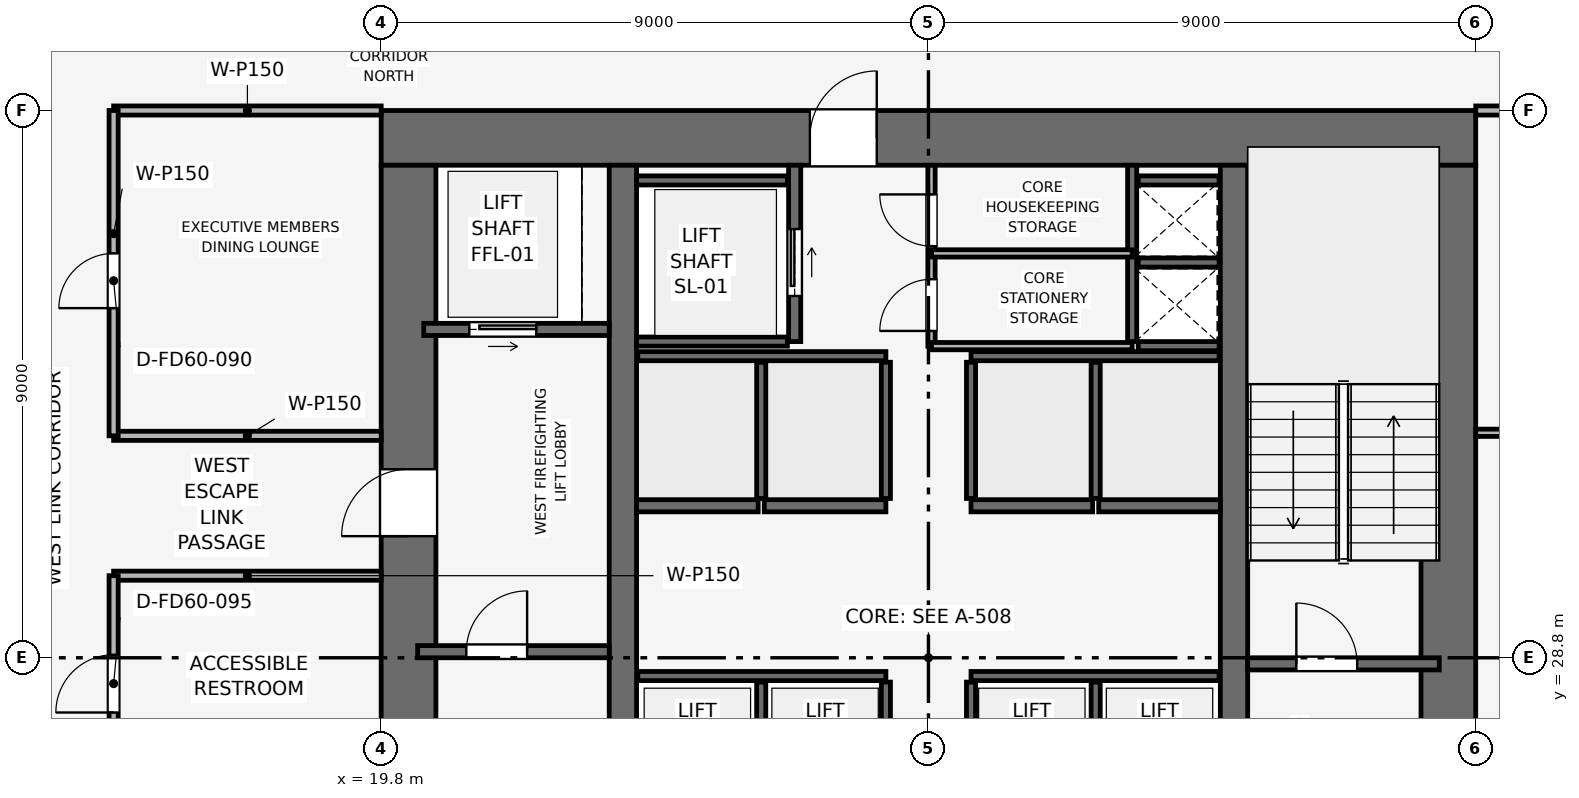
"""IFC4 building model, lengths in metres.
Left out: names, types, materials, properties, quantities, classifications, styles, units other than length and angle.
Written with IfcOpenShell. Run it as: python <this file> out.ifc"""

import sys

from ifc_helpers import new_model, si_unit, direction, frame, frame_2d, origin, place, context, subcontext, project, spatial, rectangle, extrude, element, fill, save


model = new_model("IFC4")
c1 = context("Model", 3, precision=1e-05, world=origin(), true_north=direction((0.0, 1.0)))
c2 = subcontext(c1, "Body", "Model", "MODEL_VIEW")
j1 = project(units=[si_unit("LENGTHUNIT", "METRE"), si_unit("PLANEANGLEUNIT", "RADIAN")], contexts=[c1])
p1 = place(None, origin())
s1 = spatial("IfcSite", under=j1, at=p1, CompositionType="ELEMENT")
p2 = place(p1, origin())
s2 = spatial("IfcBuilding", under=s1, at=p2, CompositionType="ELEMENT")
p3 = place(p2, frame((0.0, 0.0, 187.05)))
s3 = spatial("IfcBuildingStorey", under=s2, at=p3, CompositionType="ELEMENT", Elevation=187.05)
p4 = place(p3, frame((19.8, 37.35, 0.0), z_axis=(0.0, 0.0, 1.0), x_axis=(1.0, 0.0, 0.0)))
e1 = element("IfcWall", 1, at=p4, inside=s3, PredefinedType="SHEAR", context=c2, shape_type="SweptSolid", body=[
    extrude(rectangle(XDim=18.0, YDim=0.9, at=frame_2d((9.0, 0.0))), origin(), (0.0, 0.0, 1.0), 3.75),
])
p5 = place(p4, frame((7.05, 0.0, 0.0)))
e2 = element("IfcOpeningElement", 2, at=p5, cuts=e1, PredefinedType="OPENING", context=c2, shape_type="SweptSolid", body=[
    extrude(rectangle(XDim=1.1, YDim=2.15, at=frame_2d((0.55, 1.075))), frame((0.0, 0.46, 0.0), z_axis=(0.0, -1.0, 0.0), x_axis=(1.0, 0.0, 0.0)), (0.0, 0.0, 1.0), 0.92),
])
p6 = place(p3, frame((20.25, 20.7, 0.0), z_axis=(0.0, 0.0, 1.0), x_axis=(0.0, 1.0, 0.0)))
e3 = element("IfcWall", 3, at=p6, inside=s3, PredefinedType="SHEAR", context=c2, shape_type="SweptSolid", body=[
    extrude(rectangle(XDim=16.2, YDim=0.9, at=frame_2d((8.1, 0.0))), origin(), (0.0, 0.0, 1.0), 3.75),
])
p7 = place(p6, frame((10.1, 0.0, 0.0)))
e4 = element("IfcOpeningElement", 4, at=p7, cuts=e3, PredefinedType="OPENING", context=c2, shape_type="SweptSolid", body=[
    extrude(rectangle(XDim=1.1, YDim=2.15, at=frame_2d((0.55, 1.075))), frame((0.0, 0.46, 0.0), z_axis=(0.0, -1.0, 0.0), x_axis=(1.0, 0.0, 0.0)), (0.0, 0.0, 1.0), 0.92),
])
p8 = place(p3, frame((37.35, 20.7, 0.0), z_axis=(0.0, 0.0, 1.0), x_axis=(0.0, 1.0, 0.0)))
e5 = element("IfcWall", 5, at=p8, inside=s3, PredefinedType="SHEAR", context=c2, shape_type="SweptSolid", body=[
    extrude(rectangle(XDim=16.2, YDim=0.9, at=frame_2d((8.1, 0.0))), origin(), (0.0, 0.0, 1.0), 3.75),
])
p9 = place(p8, frame((4.6, 0.0, 0.0)))
e6 = element("IfcOpeningElement", 6, at=p9, cuts=e5, PredefinedType="OPENING", context=c2, shape_type="SweptSolid", body=[
    extrude(rectangle(XDim=1.1, YDim=2.15, at=frame_2d((0.55, 1.075))), frame((0.0, 0.46, 0.0), z_axis=(0.0, -1.0, 0.0), x_axis=(1.0, 0.0, 0.0)), (0.0, 0.0, 1.0), 0.92),
])
for number, where, z_axis, x_axis in (
    (7, (23.775, 20.7, 0.0), (0.0, 0.0, 1.0), (0.0, 1.0, 0.0)),
    (8, (33.825, 20.7, 0.0), (0.0, 0.0, 1.0), (0.0, 1.0, 0.0)),
):
    element("IfcWall", number, at=place(p3, frame(where, z_axis=z_axis, x_axis=x_axis)), inside=s3, PredefinedType="SHEAR", context=c2, shape_type="SweptSolid", body=[
        extrude(rectangle(XDim=16.2, YDim=0.45, at=frame_2d((8.1, 0.0))), origin(), (0.0, 0.0, 1.0), 3.75),
    ])
p10 = place(p3, frame((20.4, 28.9, 0.0), z_axis=(0.0, 0.0, 1.0), x_axis=(1.0, 0.0, 0.0)))
e9 = element("IfcWall", 9, at=p10, inside=s3, PredefinedType="SHEAR", context=c2, shape_type="SweptSolid", body=[
    extrude(rectangle(XDim=3.15, YDim=0.2, at=frame_2d((1.575, 0.0))), origin(), (0.0, 0.0, 1.0), 3.495),
])
p11 = place(p10, frame((0.8, 0.0, 0.0)))
e10 = element("IfcOpeningElement", 10, at=p11, cuts=e9, PredefinedType="OPENING", context=c2, shape_type="SweptSolid", body=[
    extrude(rectangle(XDim=1.0, YDim=2.1, at=frame_2d((0.5, 1.05))), frame((0.0, 0.11, 0.0), z_axis=(0.0, -1.0, 0.0), x_axis=(1.0, 0.0, 0.0)), (0.0, 0.0, 1.0), 0.22),
])
p12 = place(p3, frame((34.05, 28.7, 0.0), z_axis=(0.0, 0.0, 1.0), x_axis=(1.0, 0.0, 0.0)))
e11 = element("IfcWall", 11, at=p12, inside=s3, PredefinedType="SHEAR", context=c2, shape_type="SweptSolid", body=[
    extrude(rectangle(XDim=3.15, YDim=0.2, at=frame_2d((1.575, 0.0))), origin(), (0.0, 0.0, 1.0), 3.495),
])
p13 = place(p12, frame((0.8, 0.0, 0.0)))
e12 = element("IfcOpeningElement", 12, at=p13, cuts=e11, PredefinedType="OPENING", context=c2, shape_type="SweptSolid", body=[
    extrude(rectangle(XDim=1.0, YDim=2.1, at=frame_2d((0.5, 1.05))), frame((0.0, 0.11, 0.0), z_axis=(0.0, -1.0, 0.0), x_axis=(1.0, 0.0, 0.0)), (0.0, 0.0, 1.0), 0.22),
])
p14 = place(p3, frame((32.15, 34.0, 0.0), z_axis=(0.0, 0.0, 1.0), x_axis=(0.0, 1.0, 0.0)))
e13 = element("IfcWall", 13, at=p14, inside=s3, PredefinedType="SHEAR", context=c2, shape_type="SweptSolid", body=[
    extrude(rectangle(XDim=2.9, YDim=0.15, at=frame_2d((1.45, 0.0))), origin(), (0.0, 0.0, 1.0), 3.495),
])
for number, where, z_axis, x_axis in (
    (14, (32.25, 33.925, 0.0), (0.0, 0.0, 1.0), (1.0, 0.0, 0.0)),
    (15, (32.25, 35.3, 0.0), (0.0, 0.0, 1.0), (1.0, 0.0, 0.0)),
):
    element("IfcWall", number, at=place(p3, frame(where, z_axis=z_axis, x_axis=x_axis)), inside=s3, PredefinedType="SHEAR", context=c2, shape_type="SweptSolid", body=[
        extrude(rectangle(XDim=1.33, YDim=0.15, at=frame_2d((0.665, 0.0))), origin(), (0.0, 0.0, 1.0), 3.495),
    ])
p15 = place(p3, frame((20.5, 34.2, 0.0), z_axis=(0.0, 0.0, 1.0), x_axis=(1.0, 0.0, 0.0)))
e16 = element("IfcWall", 16, at=p15, inside=s3, PredefinedType="SHEAR", context=c2, shape_type="SweptSolid", body=[
    extrude(rectangle(XDim=3.05, YDim=0.2, at=frame_2d((1.525, 0.0))), origin(), (0.0, 0.0, 1.0), 3.495),
])
p16 = place(p15, frame((0.75, 0.0, 0.0)))
e17 = element("IfcOpeningElement", 17, at=p16, cuts=e16, PredefinedType="OPENING", context=c2, shape_type="SweptSolid", body=[
    extrude(rectangle(XDim=1.1, YDim=2.15, at=frame_2d((0.55, 1.075))), frame((0.0, 0.11, 0.0), z_axis=(0.0, -1.0, 0.0), x_axis=(1.0, 0.0, 0.0)), (0.0, 0.0, 1.0), 0.22),
])
p17 = place(p3, frame((26.6, 34.0, 0.0), z_axis=(0.0, 0.0, 1.0), x_axis=(0.0, 1.0, 0.0)))
e18 = element("IfcWall", 18, at=p17, inside=s3, PredefinedType="SHEAR", context=c2, shape_type="SweptSolid", body=[
    extrude(rectangle(XDim=2.9, YDim=0.2, at=frame_2d((1.45, 0.0))), origin(), (0.0, 0.0, 1.0), 3.495),
])
p18 = place(p17, frame((0.75, 0.0, 0.0)))
e19 = element("IfcOpeningElement", 19, at=p18, cuts=e18, PredefinedType="OPENING", context=c2, shape_type="SweptSolid", body=[
    extrude(rectangle(XDim=1.1, YDim=2.15, at=frame_2d((0.55, 1.075))), frame((0.0, 0.11, 0.0), z_axis=(0.0, -1.0, 0.0), x_axis=(1.0, 0.0, 0.0)), (0.0, 0.0, 1.0), 0.22),
])
for number, where, z_axis, x_axis in (
    (20, (24.0, 34.0, 0.0), (0.0, 0.0, 1.0), (1.0, 0.0, 0.0)),
    (21, (24.0, 36.65, 0.0), (0.0, 0.0, 1.0), (1.0, 0.0, 0.0)),
):
    element("IfcWall", number, at=place(p3, frame(where, z_axis=z_axis, x_axis=x_axis)), inside=s3, PredefinedType="SHEAR", context=c2, shape_type="SweptSolid", body=[
        extrude(rectangle(XDim=2.48, YDim=0.15, at=frame_2d((1.24, 0.0))), origin(), (0.0, 0.0, 1.0), 3.495),
    ])
for number, where, z_axis, x_axis in (
    (22, (24.0, 31.3, 0.0), (0.0, 0.0, 1.0), (1.0, 0.0, 0.0)),
    (23, (26.1, 31.3, 0.0), (0.0, 0.0, 1.0), (1.0, 0.0, 0.0)),
    (24, (29.5, 31.3, 0.0), (0.0, 0.0, 1.0), (1.0, 0.0, 0.0)),
    (25, (31.6, 31.3, 0.0), (0.0, 0.0, 1.0), (1.0, 0.0, 0.0)),
):
    element("IfcWall", number, at=place(p3, frame(where, z_axis=z_axis, x_axis=x_axis)), inside=s3, PredefinedType="SHEAR", context=c2, shape_type="SweptSolid", body=[
        extrude(rectangle(XDim=2.0, YDim=0.2, at=frame_2d((1.0, 0.0))), origin(), (0.0, 0.0, 1.0), 3.495),
    ])
p19 = place(p3, frame((32.25, 36.65, 0.0), z_axis=(0.0, 0.0, 1.0), x_axis=(1.0, 0.0, 0.0)))
e26 = element("IfcWall", 26, at=p19, inside=s3, PredefinedType="SHEAR", context=c2, shape_type="SweptSolid", body=[
    extrude(rectangle(XDim=1.33, YDim=0.15, at=frame_2d((0.665, 0.0))), origin(), (0.0, 0.0, 1.0), 3.495),
])
for number, where, z_axis, x_axis in (
    (27, (24.02, 28.5, 0.0), (0.0, 0.0, 1.0), (1.0, 0.0, 0.0)),
    (28, (29.5, 28.5, 0.0), (0.0, 0.0, 1.0), (1.0, 0.0, 0.0)),
):
    element("IfcWall", number, at=place(p3, frame(where, z_axis=z_axis, x_axis=x_axis)), inside=s3, PredefinedType="SHEAR", context=c2, shape_type="SweptSolid", body=[
        extrude(rectangle(XDim=4.08, YDim=0.15, at=frame_2d((2.04, 0.0))), origin(), (0.0, 0.0, 1.0), 3.495),
    ])
for number, where, z_axis, x_axis in (
    (29, (26.05, 26.12, 0.0), (0.0, 0.0, 1.0), (0.0, 1.0, 0.0)),
    (30, (28.1, 26.12, 0.0), (0.0, 0.0, 1.0), (0.0, 1.0, 0.0)),
    (31, (29.5, 26.12, 0.0), (0.0, 0.0, 1.0), (0.0, 1.0, 0.0)),
    (32, (31.55, 26.12, 0.0), (0.0, 0.0, 1.0), (0.0, 1.0, 0.0)),
):
    element("IfcWall", number, at=place(p3, frame(where, z_axis=z_axis, x_axis=x_axis)), inside=s3, PredefinedType="SHEAR", context=c2, shape_type="SweptSolid", body=[
        extrude(rectangle(XDim=2.28, YDim=0.15, at=frame_2d((1.14, 0.0))), origin(), (0.0, 0.0, 1.0), 3.495),
    ])
for number, where, z_axis, x_axis in (
    (33, (24.02, 33.76, 0.0), (0.0, 0.0, 1.0), (1.0, 0.0, 0.0)),
    (34, (29.5, 33.76, 0.0), (0.0, 0.0, 1.0), (1.0, 0.0, 0.0)),
):
    element("IfcWall", number, at=place(p3, frame(where, z_axis=z_axis, x_axis=x_axis)), inside=s3, PredefinedType="SHEAR", context=c2, shape_type="SweptSolid", body=[
        extrude(rectangle(XDim=4.08, YDim=0.15, at=frame_2d((2.04, 0.0))), origin(), (0.0, 0.0, 1.0), 3.495),
    ])
for number, where, z_axis, x_axis in (
    (35, (26.05, 31.42, 0.0), (0.0, 0.0, 1.0), (0.0, 1.0, 0.0)),
    (36, (28.1, 31.42, 0.0), (0.0, 0.0, 1.0), (0.0, 1.0, 0.0)),
    (37, (29.5, 31.42, 0.0), (0.0, 0.0, 1.0), (0.0, 1.0, 0.0)),
    (38, (31.55, 31.42, 0.0), (0.0, 0.0, 1.0), (0.0, 1.0, 0.0)),
):
    element("IfcWall", number, at=place(p3, frame(where, z_axis=z_axis, x_axis=x_axis)), inside=s3, PredefinedType="SHEAR", context=c2, shape_type="SweptSolid", body=[
        extrude(rectangle(XDim=2.24, YDim=0.15, at=frame_2d((1.12, 0.0))), origin(), (0.0, 0.0, 1.0), 3.495),
    ])
p20 = place(p3, frame((28.85, 33.925, 0.0), z_axis=(0.0, 0.0, 1.0), x_axis=(0.0, 1.0, 0.0)))
e39 = element("IfcWall", 39, at=p20, inside=s3, PredefinedType="PARTITIONING", context=c2, shape_type="SweptSolid", body=[
    extrude(rectangle(XDim=2.975, YDim=0.12, at=frame_2d((1.487, 0.0))), origin(), (0.0, 0.0, 1.0), 3.495),
])
p21 = place(p20, frame((0.25, 0.0, 0.0)))
e40 = element("IfcOpeningElement", 40, at=p21, cuts=e39, PredefinedType="OPENING", context=c2, shape_type="SweptSolid", body=[
    extrude(rectangle(XDim=0.85, YDim=2.1, at=frame_2d((0.425, 1.05))), frame((0.0, 0.07, 0.0), z_axis=(0.0, -1.0, 0.0), x_axis=(1.0, 0.0, 0.0)), (0.0, 0.0, 1.0), 0.14),
])
p22 = place(p20, frame((1.645, 0.0, 0.0)))
e41 = element("IfcOpeningElement", 41, at=p22, cuts=e39, PredefinedType="OPENING", context=c2, shape_type="SweptSolid", body=[
    extrude(rectangle(XDim=0.85, YDim=2.1, at=frame_2d((0.425, 1.05))), frame((0.0, 0.07, 0.0), z_axis=(0.0, -1.0, 0.0), x_axis=(1.0, 0.0, 0.0)), (0.0, 0.0, 1.0), 0.14),
])
for number, where, z_axis, x_axis in (
    (42, (28.85, 35.45, 0.0), (0.0, 0.0, 1.0), (1.0, 0.0, 0.0)),
    (43, (28.85, 33.925, 0.0), (0.0, 0.0, 1.0), (1.0, 0.0, 0.0)),
):
    element("IfcWall", number, at=place(p3, frame(where, z_axis=z_axis, x_axis=x_axis)), inside=s3, PredefinedType="PARTITIONING", context=c2, shape_type="SweptSolid", body=[
        extrude(rectangle(XDim=3.3, YDim=0.12, at=frame_2d((1.65, 0.0))), origin(), (0.0, 0.0, 1.0), 3.495),
    ])
for number, where, z_axis, x_axis in (
    (44, (15.4, 30.15, 0.0), (0.0, 0.0, 1.0), (1.0, 0.0, 0.0)),
    (45, (15.4, 32.45, 0.0), (0.0, 0.0, 1.0), (1.0, 0.0, 0.0)),
):
    element("IfcWall", number, at=place(p3, frame(where, z_axis=z_axis, x_axis=x_axis)), inside=s3, PredefinedType="PARTITIONING", context=c2, shape_type="SweptSolid", body=[
        extrude(rectangle(XDim=4.4, YDim=0.15, at=frame_2d((2.2, 0.0))), origin(), (0.0, 0.0, 1.0), 3.495),
    ])
p23 = place(p3, frame((15.4, 37.8, 0.0), z_axis=(0.0, 0.0, 1.0), x_axis=(1.0, 0.0, 0.0)))
e46 = element("IfcWall", 46, at=p23, inside=s3, PredefinedType="PARTITIONING", context=c2, shape_type="SweptSolid", body=[
    extrude(rectangle(XDim=4.4, YDim=0.15, at=frame_2d((2.2, 0.0))), origin(), (0.0, 0.0, 1.0), 3.03),
])
p24 = place(p3, frame((15.4, 19.8, 0.0), z_axis=(0.0, 0.0, 1.0), x_axis=(0.0, 1.0, 0.0)))
e47 = element("IfcWall", 47, at=p24, inside=s3, PredefinedType="PARTITIONING", context=c2, shape_type="SweptSolid", body=[
    extrude(rectangle(XDim=10.35, YDim=0.15, at=frame_2d((5.175, 0.0))), origin(), (0.0, 0.0, 1.0), 3.03),
])
p25 = place(p24, frame((1.2, 0.0, 0.0)))
e48 = element("IfcOpeningElement", 48, at=p25, cuts=e47, PredefinedType="OPENING", context=c2, shape_type="SweptSolid", body=[
    extrude(rectangle(XDim=0.9, YDim=2.1, at=frame_2d((0.45, 1.05))), frame((0.0, 0.085, 0.0), z_axis=(0.0, -1.0, 0.0), x_axis=(1.0, 0.0, 0.0)), (0.0, 0.0, 1.0), 0.17),
])
p26 = place(p24, frame((4.7, 0.0, 0.0)))
e49 = element("IfcOpeningElement", 49, at=p26, cuts=e47, PredefinedType="OPENING", context=c2, shape_type="SweptSolid", body=[
    extrude(rectangle(XDim=0.9, YDim=2.1, at=frame_2d((0.45, 1.05))), frame((0.0, 0.085, 0.0), z_axis=(0.0, -1.0, 0.0), x_axis=(1.0, 0.0, 0.0)), (0.0, 0.0, 1.0), 0.17),
])
p27 = place(p24, frame((8.1, 0.0, 0.0)))
e50 = element("IfcOpeningElement", 50, at=p27, cuts=e47, PredefinedType="OPENING", context=c2, shape_type="SweptSolid", body=[
    extrude(rectangle(XDim=0.95, YDim=2.1, at=frame_2d((0.475, 1.05))), frame((0.0, 0.085, 0.0), z_axis=(0.0, -1.0, 0.0), x_axis=(1.0, 0.0, 0.0)), (0.0, 0.0, 1.0), 0.17),
])
p28 = place(p3, frame((15.4, 32.45, 0.0), z_axis=(0.0, 0.0, 1.0), x_axis=(0.0, 1.0, 0.0)))
e51 = element("IfcWall", 51, at=p28, inside=s3, PredefinedType="PARTITIONING", context=c2, shape_type="SweptSolid", body=[
    extrude(rectangle(XDim=5.35, YDim=0.15, at=frame_2d((2.675, 0.0))), origin(), (0.0, 0.0, 1.0), 3.03),
])
p29 = place(p28, frame((2.1, 0.0, 0.0)))
e52 = element("IfcOpeningElement", 52, at=p29, cuts=e51, PredefinedType="OPENING", context=c2, shape_type="SweptSolid", body=[
    extrude(rectangle(XDim=0.9, YDim=2.1, at=frame_2d((0.45, 1.05))), frame((0.0, 0.085, 0.0), z_axis=(0.0, -1.0, 0.0), x_axis=(1.0, 0.0, 0.0)), (0.0, 0.0, 1.0), 0.17),
])
p30 = place(p3, frame((37.8, 32.5, 0.0), z_axis=(0.0, 0.0, 1.0), x_axis=(1.0, 0.0, 0.0)))
e53 = element("IfcWall", 53, at=p30, inside=s3, PredefinedType="PARTITIONING", context=c2, shape_type="SweptSolid", body=[
    extrude(rectangle(XDim=15.17, YDim=0.12, at=frame_2d((7.585, 0.0))), origin(), (0.0, 0.0, 1.0), 2.98),
])
p31 = place(p3, frame((37.8, 37.8, 0.0), z_axis=(0.0, 0.0, 1.0), x_axis=(1.0, 0.0, 0.0)))
e54 = element("IfcWall", 54, at=p31, inside=s3, PredefinedType="PARTITIONING", context=c2, shape_type="SweptSolid", body=[
    extrude(rectangle(XDim=15.17, YDim=0.15, at=frame_2d((7.585, 0.0))), origin(), (0.0, 0.0, 1.0), 2.98),
])
p32 = place(p31, frame((3.4, 0.0, 0.0)))
e55 = element("IfcOpeningElement", 55, at=p32, cuts=e54, PredefinedType="OPENING", context=c2, shape_type="SweptSolid", body=[
    extrude(rectangle(XDim=0.9, YDim=2.1, at=frame_2d((0.45, 1.05))), frame((0.0, 0.085, 0.0), z_axis=(0.0, -1.0, 0.0), x_axis=(1.0, 0.0, 0.0)), (0.0, 0.0, 1.0), 0.17),
])
p33 = place(p11, origin())
e56 = element("IfcDoor", 56, at=p33, inside=s3, OperationType="SINGLE_SWING_RIGHT", PredefinedType="DOOR", context=c2, shape_type="SweptSolid", body=[
    extrude(rectangle(XDim=1.0, YDim=2.1, at=frame_2d((0.5, 1.05))), frame((0.0, 0.025, 0.0), z_axis=(0.0, -1.0, 0.0), x_axis=(1.0, 0.0, 0.0)), (0.0, 0.0, 1.0), 0.05),
])
fill(e10, e56)
p34 = place(p13, origin())
e57 = element("IfcDoor", 57, at=p34, inside=s3, OperationType="SINGLE_SWING_LEFT", PredefinedType="DOOR", context=c2, shape_type="SweptSolid", body=[
    extrude(rectangle(XDim=1.0, YDim=2.1, at=frame_2d((0.5, 1.05))), frame((0.0, 0.025, 0.0), z_axis=(0.0, -1.0, 0.0), x_axis=(1.0, 0.0, 0.0)), (0.0, 0.0, 1.0), 0.05),
])
fill(e12, e57)
p35 = place(p16, origin())
e58 = element("IfcDoor", 58, at=p35, inside=s3, OperationType="SLIDING_TO_RIGHT", PredefinedType="DOOR", context=c2, shape_type="SweptSolid", body=[
    extrude(rectangle(XDim=1.1, YDim=2.15, at=frame_2d((0.55, 1.075))), frame((0.0, 0.025, 0.0), z_axis=(0.0, -1.0, 0.0), x_axis=(1.0, 0.0, 0.0)), (0.0, 0.0, 1.0), 0.05),
])
fill(e17, e58)
p36 = place(p18, origin())
e59 = element("IfcDoor", 59, at=p36, inside=s3, OperationType="SLIDING_TO_RIGHT", PredefinedType="DOOR", context=c2, shape_type="SweptSolid", body=[
    extrude(rectangle(XDim=1.1, YDim=2.15, at=frame_2d((0.55, 1.075))), frame((0.0, 0.025, 0.0), z_axis=(0.0, -1.0, 0.0), x_axis=(1.0, 0.0, 0.0)), (0.0, 0.0, 1.0), 0.05),
])
fill(e19, e59)
p37 = place(p21, origin())
e60 = element("IfcDoor", 60, at=p37, inside=s3, OperationType="SINGLE_SWING_LEFT", PredefinedType="DOOR", context=c2, shape_type="SweptSolid", body=[
    extrude(rectangle(XDim=0.85, YDim=2.1, at=frame_2d((0.425, 1.05))), frame((0.0, 0.025, 0.0), z_axis=(0.0, -1.0, 0.0), x_axis=(1.0, 0.0, 0.0)), (0.0, 0.0, 1.0), 0.05),
])
fill(e40, e60)
p38 = place(p22, origin())
e61 = element("IfcDoor", 61, at=p38, inside=s3, OperationType="SINGLE_SWING_RIGHT", PredefinedType="DOOR", context=c2, shape_type="SweptSolid", body=[
    extrude(rectangle(XDim=0.85, YDim=2.1, at=frame_2d((0.425, 1.05))), frame((0.0, 0.025, 0.0), z_axis=(0.0, -1.0, 0.0), x_axis=(1.0, 0.0, 0.0)), (0.0, 0.0, 1.0), 0.05),
])
fill(e41, e61)
p39 = place(p27, origin())
e62 = element("IfcDoor", 62, at=p39, inside=s3, OperationType="SINGLE_SWING_LEFT", PredefinedType="DOOR", context=c2, shape_type="SweptSolid", body=[
    extrude(rectangle(XDim=0.95, YDim=2.1, at=frame_2d((0.475, 1.05))), frame((0.0, 0.025, 0.0), z_axis=(0.0, -1.0, 0.0), x_axis=(1.0, 0.0, 0.0)), (0.0, 0.0, 1.0), 0.05),
])
fill(e50, e62)
p40 = place(p29, origin())
e63 = element("IfcDoor", 63, at=p40, inside=s3, OperationType="SINGLE_SWING_LEFT", PredefinedType="DOOR", context=c2, shape_type="SweptSolid", body=[
    extrude(rectangle(XDim=0.9, YDim=2.1, at=frame_2d((0.45, 1.05))), frame((0.0, 0.025, 0.0), z_axis=(0.0, -1.0, 0.0), x_axis=(1.0, 0.0, 0.0)), (0.0, 0.0, 1.0), 0.05),
])
fill(e52, e63)
p41 = place(p7, origin())
e64 = element("IfcDoor", 64, at=p41, inside=s3, OperationType="SINGLE_SWING_LEFT", PredefinedType="DOOR", context=c2, shape_type="SweptSolid", body=[
    extrude(rectangle(XDim=1.1, YDim=2.15, at=frame_2d((0.55, 1.075))), frame((0.0, 0.025, 0.0), z_axis=(0.0, -1.0, 0.0), x_axis=(1.0, 0.0, 0.0)), (0.0, 0.0, 1.0), 0.05),
])
fill(e4, e64)
p42 = place(p5, origin())
e65 = element("IfcDoor", 65, at=p42, inside=s3, OperationType="SINGLE_SWING_RIGHT", PredefinedType="DOOR", context=c2, shape_type="SweptSolid", body=[
    extrude(rectangle(XDim=1.1, YDim=2.15, at=frame_2d((0.55, 1.075))), frame((0.0, 0.025, 0.0), z_axis=(0.0, -1.0, 0.0), x_axis=(1.0, 0.0, 0.0)), (0.0, 0.0, 1.0), 0.05),
])
fill(e2, e65)
save(model, sys.argv[1])
